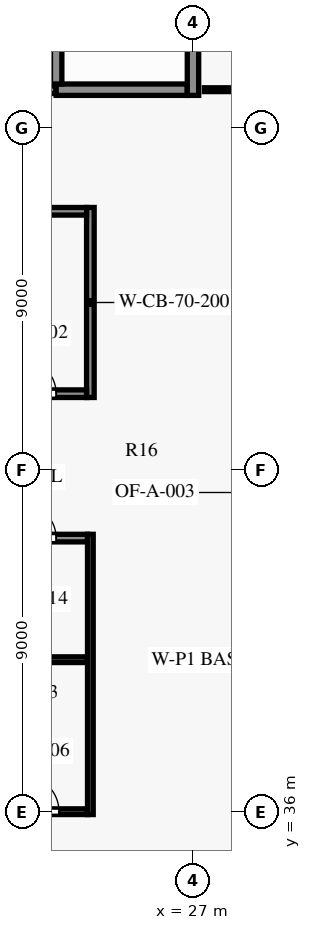
"""IFC4 building model, lengths in metres.
Left out: names, types, materials, properties, quantities, classifications, styles, units other than length and angle.
Written with IfcOpenShell. Run it as: python <this file> out.ifc"""

import sys

from ifc_helpers import new_model, si_unit, direction, frame, frame_2d, origin, place, context, subcontext, project, spatial, rectangle, extrude, element, fill, save


model = new_model("IFC4")
c1 = context("Model", 3, precision=1e-05, world=origin(), true_north=direction((0.0, 1.0)))
c2 = subcontext(c1, "Body", "Model", "MODEL_VIEW")
j1 = project(units=[si_unit("LENGTHUNIT", "METRE"), si_unit("PLANEANGLEUNIT", "RADIAN")], contexts=[c1])
p1 = place(None, origin())
s1 = spatial("IfcSite", under=j1, at=p1, CompositionType="ELEMENT")
p2 = place(p1, origin())
s2 = spatial("IfcBuilding", under=s1, at=p2, CompositionType="ELEMENT")
p3 = place(p2, frame((0.0, 0.0, 96.1)))
s3 = spatial("IfcBuildingStorey", under=s2, at=p3, CompositionType="ELEMENT", Elevation=96.1)
p4 = place(p3, frame((12.4, 36.0, 0.0), z_axis=(0.0, 0.0, 1.0), x_axis=(1.0, 0.0, 0.0)))
e1 = element("IfcWall", 1, at=p4, inside=s3, PredefinedType="SHEAR", context=c2, shape_type="SweptSolid", body=[
    extrude(rectangle(XDim=11.825, YDim=0.15, at=frame_2d((5.913, 0.0))), origin(), (0.0, 0.0, 1.0), 3.5),
])
p5 = place(p4, frame((1.05, 0.0, 0.0)))
e2 = element("IfcOpeningElement", 2, at=p5, cuts=e1, PredefinedType="OPENING", context=c2, shape_type="SweptSolid", body=[
    extrude(rectangle(XDim=0.9, YDim=2.1, at=frame_2d((0.45, 1.05))), frame((0.0, 0.085, 0.0), z_axis=(0.0, -1.0, 0.0), x_axis=(1.0, 0.0, 0.0)), (0.0, 0.0, 1.0), 0.17),
])
p6 = place(p4, frame((4.15, 0.0, 0.0)))
e3 = element("IfcOpeningElement", 3, at=p6, cuts=e1, PredefinedType="OPENING", context=c2, shape_type="SweptSolid", body=[
    extrude(rectangle(XDim=1.0, YDim=2.1, at=frame_2d((0.5, 1.05))), frame((0.0, 0.085, 0.0), z_axis=(0.0, -1.0, 0.0), x_axis=(1.0, 0.0, 0.0)), (0.0, 0.0, 1.0), 0.17),
])
p7 = place(p4, frame((7.35, 0.0, 0.0)))
e4 = element("IfcOpeningElement", 4, at=p7, cuts=e1, PredefinedType="OPENING", context=c2, shape_type="SweptSolid", body=[
    extrude(rectangle(XDim=0.9, YDim=2.1, at=frame_2d((0.45, 1.05))), frame((0.0, 0.085, 0.0), z_axis=(0.0, -1.0, 0.0), x_axis=(1.0, 0.0, 0.0)), (0.0, 0.0, 1.0), 0.17),
])
p8 = place(p4, frame((10.125, 0.0, 0.0)))
e5 = element("IfcOpeningElement", 5, at=p8, cuts=e1, PredefinedType="OPENING", context=c2, shape_type="SweptSolid", body=[
    extrude(rectangle(XDim=0.95, YDim=2.1, at=frame_2d((0.475, 1.05))), frame((0.0, 0.085, 0.0), z_axis=(0.0, -1.0, 0.0), x_axis=(1.0, 0.0, 0.0)), (0.0, 0.0, 1.0), 0.17),
])
p9 = place(p3, frame((21.6, 40.0, 0.0), z_axis=(0.0, 0.0, 1.0), x_axis=(1.0, 0.0, 0.0)))
e6 = element("IfcWall", 6, at=p9, inside=s3, PredefinedType="PARTITIONING", context=c2, shape_type="SweptSolid", body=[
    extrude(rectangle(XDim=2.625, YDim=0.15, at=frame_2d((1.312, 0.0))), origin(), (0.0, 0.0, 1.0), 3.5),
])
p10 = place(p3, frame((21.6, 43.2, 0.0), z_axis=(0.0, 0.0, 1.0), x_axis=(1.0, 0.0, 0.0)))
e7 = element("IfcWall", 7, at=p10, inside=s3, PredefinedType="PARTITIONING", context=c2, shape_type="SweptSolid", body=[
    extrude(rectangle(XDim=2.625, YDim=0.2, at=frame_2d((1.312, 0.0))), origin(), (0.0, 0.0, 1.0), 3.5),
])
p11 = place(p10, frame((0.9, 0.0, 0.0)))
e8 = element("IfcOpeningElement", 8, at=p11, cuts=e7, PredefinedType="OPENING", context=c2, shape_type="SweptSolid", body=[
    extrude(rectangle(XDim=0.9, YDim=2.1, at=frame_2d((0.45, 1.05))), frame((0.0, 0.11, 0.0), z_axis=(0.0, -1.0, 0.0), x_axis=(1.0, 0.0, 0.0)), (0.0, 0.0, 1.0), 0.22),
])
p12 = place(p3, frame((21.6, 47.0, 0.0), z_axis=(0.0, 0.0, 1.0), x_axis=(1.0, 0.0, 0.0)))
e9 = element("IfcWall", 9, at=p12, inside=s3, PredefinedType="PARTITIONING", context=c2, shape_type="SweptSolid", body=[
    extrude(rectangle(XDim=2.6, YDim=0.2, at=frame_2d((1.3, 0.0))), origin(), (0.0, 0.0, 1.0), 3.5),
])
p13 = place(p12, frame((0.9, 0.0, 0.0)))
e10 = element("IfcOpeningElement", 10, at=p13, cuts=e9, PredefinedType="OPENING", context=c2, shape_type="SweptSolid", body=[
    extrude(rectangle(XDim=0.9, YDim=2.1, at=frame_2d((0.45, 1.05))), frame((0.0, 0.11, 0.0), z_axis=(0.0, -1.0, 0.0), x_axis=(1.0, 0.0, 0.0)), (0.0, 0.0, 1.0), 0.22),
])
p14 = place(p3, frame((21.6, 51.8, 0.0), z_axis=(0.0, 0.0, 1.0), x_axis=(1.0, 0.0, 0.0)))
e11 = element("IfcWall", 11, at=p14, inside=s3, PredefinedType="PARTITIONING", context=c2, shape_type="SweptSolid", body=[
    extrude(rectangle(XDim=2.6, YDim=0.2, at=frame_2d((1.3, 0.0))), origin(), (0.0, 0.0, 1.0), 3.5),
])
p15 = place(p3, frame((17.3, 55.0, 0.0), z_axis=(0.0, 0.0, 1.0), x_axis=(1.0, 0.0, 0.0)))
e12 = element("IfcWall", 12, at=p15, inside=s3, PredefinedType="PARTITIONING", context=c2, shape_type="SweptSolid", body=[
    extrude(rectangle(XDim=6.1, YDim=0.2, at=frame_2d((3.05, 0.0))), origin(), (0.0, 0.0, 1.0), 3.5),
])
p16 = place(p15, frame((2.55, 0.0, 0.0)))
e13 = element("IfcOpeningElement", 13, at=p16, cuts=e12, PredefinedType="OPENING", context=c2, shape_type="SweptSolid", body=[
    extrude(rectangle(XDim=1.0, YDim=2.1, at=frame_2d((0.5, 1.05))), frame((0.0, 0.11, 0.0), z_axis=(0.0, -1.0, 0.0), x_axis=(1.0, 0.0, 0.0)), (0.0, 0.0, 1.0), 0.22),
])
p17 = place(p3, frame((23.4, 55.0, 0.0), z_axis=(0.0, 0.0, 1.0), x_axis=(1.0, 0.0, 0.0)))
e14 = element("IfcWall", 14, at=p17, inside=s3, PredefinedType="SHEAR", context=c2, shape_type="SweptSolid", body=[
    extrude(rectangle(XDim=3.45, YDim=0.3, at=frame_2d((1.725, 0.0))), origin(), (0.0, 0.0, 1.0), 3.5),
])
p18 = place(p3, frame((23.4, 55.15, 0.0), z_axis=(0.0, 0.0, 1.0), x_axis=(0.0, 1.0, 0.0)))
e15 = element("IfcWall", 15, at=p18, inside=s3, PredefinedType="SHEAR", context=c2, shape_type="SweptSolid", body=[
    extrude(rectangle(XDim=8.0, YDim=0.3, at=frame_2d((4.0, 0.0))), origin(), (0.0, 0.0, 1.0), 3.5),
])
p19 = place(p3, frame((24.3, 35.925, 0.0), z_axis=(0.0, 0.0, 1.0), x_axis=(0.0, 1.0, 0.0)))
e16 = element("IfcWall", 16, at=p19, inside=s3, PredefinedType="PARTITIONING", context=c2, shape_type="SweptSolid", body=[
    extrude(rectangle(XDim=7.375, YDim=0.15, at=frame_2d((3.688, 0.0))), origin(), (0.0, 0.0, 1.0), 3.5),
])
p20 = place(p3, frame((24.3, 46.9, 0.0), z_axis=(0.0, 0.0, 1.0), x_axis=(0.0, 1.0, 0.0)))
e17 = element("IfcWall", 17, at=p20, inside=s3, PredefinedType="SHEAR", context=c2, shape_type="SweptSolid", body=[
    extrude(rectangle(XDim=5.0, YDim=0.2, at=frame_2d((2.5, 0.0))), origin(), (0.0, 0.0, 1.0), 3.5),
])
p21 = place(p3, frame((27.0, 54.85, 0.0), z_axis=(0.0, 0.0, 1.0), x_axis=(0.0, 1.0, 0.0)))
e18 = element("IfcWall", 18, at=p21, inside=s3, PredefinedType="SHEAR", context=c2, shape_type="SweptSolid", body=[
    extrude(rectangle(XDim=8.45, YDim=0.3, at=frame_2d((4.225, 0.0))), origin(), (0.0, 0.0, 1.0), 3.5),
])
p22 = place(p21, frame((6.55, 0.0, 0.0)))
e19 = element("IfcOpeningElement", 19, at=p22, cuts=e18, PredefinedType="OPENING", context=c2, shape_type="SweptSolid", body=[
    extrude(rectangle(XDim=1.2, YDim=2.2, at=frame_2d((0.6, 1.1))), frame((0.0, 0.16, 0.0), z_axis=(0.0, -1.0, 0.0), x_axis=(1.0, 0.0, 0.0)), (0.0, 0.0, 1.0), 0.32),
])
p23 = place(p3, frame((27.3, 55.0, 0.0), z_axis=(0.0, 0.0, 1.0), x_axis=(1.0, 0.0, 0.0)))
e20 = element("IfcWall", 20, at=p23, inside=s3, PredefinedType="PARTITIONING", context=c2, shape_type="SweptSolid", body=[
    extrude(rectangle(XDim=3.25, YDim=0.1, at=frame_2d((1.625, 0.0))), origin(), (0.0, 0.0, 1.0), 3.48),
])
p24 = place(p13, origin())
e21 = element("IfcDoor", 21, at=p24, inside=s3, OperationType="SINGLE_SWING_LEFT", PredefinedType="DOOR", context=c2, shape_type="SweptSolid", body=[
    extrude(rectangle(XDim=0.9, YDim=2.1, at=frame_2d((0.45, 1.05))), frame((0.0, 0.025, 0.0), z_axis=(0.0, -1.0, 0.0), x_axis=(1.0, 0.0, 0.0)), (0.0, 0.0, 1.0), 0.05),
])
fill(e10, e21)
p25 = place(p8, origin())
e22 = element("IfcDoor", 22, at=p25, inside=s3, OperationType="SINGLE_SWING_LEFT", PredefinedType="DOOR", context=c2, shape_type="SweptSolid", body=[
    extrude(rectangle(XDim=0.95, YDim=2.1, at=frame_2d((0.475, 1.05))), frame((0.0, 0.025, 0.0), z_axis=(0.0, -1.0, 0.0), x_axis=(1.0, 0.0, 0.0)), (0.0, 0.0, 1.0), 0.05),
])
fill(e5, e22)
p26 = place(p11, origin())
e23 = element("IfcDoor", 23, at=p26, inside=s3, OperationType="SINGLE_SWING_RIGHT", PredefinedType="DOOR", context=c2, shape_type="SweptSolid", body=[
    extrude(rectangle(XDim=0.9, YDim=2.1, at=frame_2d((0.45, 1.05))), frame((0.0, 0.025, 0.0), z_axis=(0.0, -1.0, 0.0), x_axis=(1.0, 0.0, 0.0)), (0.0, 0.0, 1.0), 0.05),
])
fill(e8, e23)
save(model, sys.argv[1])
